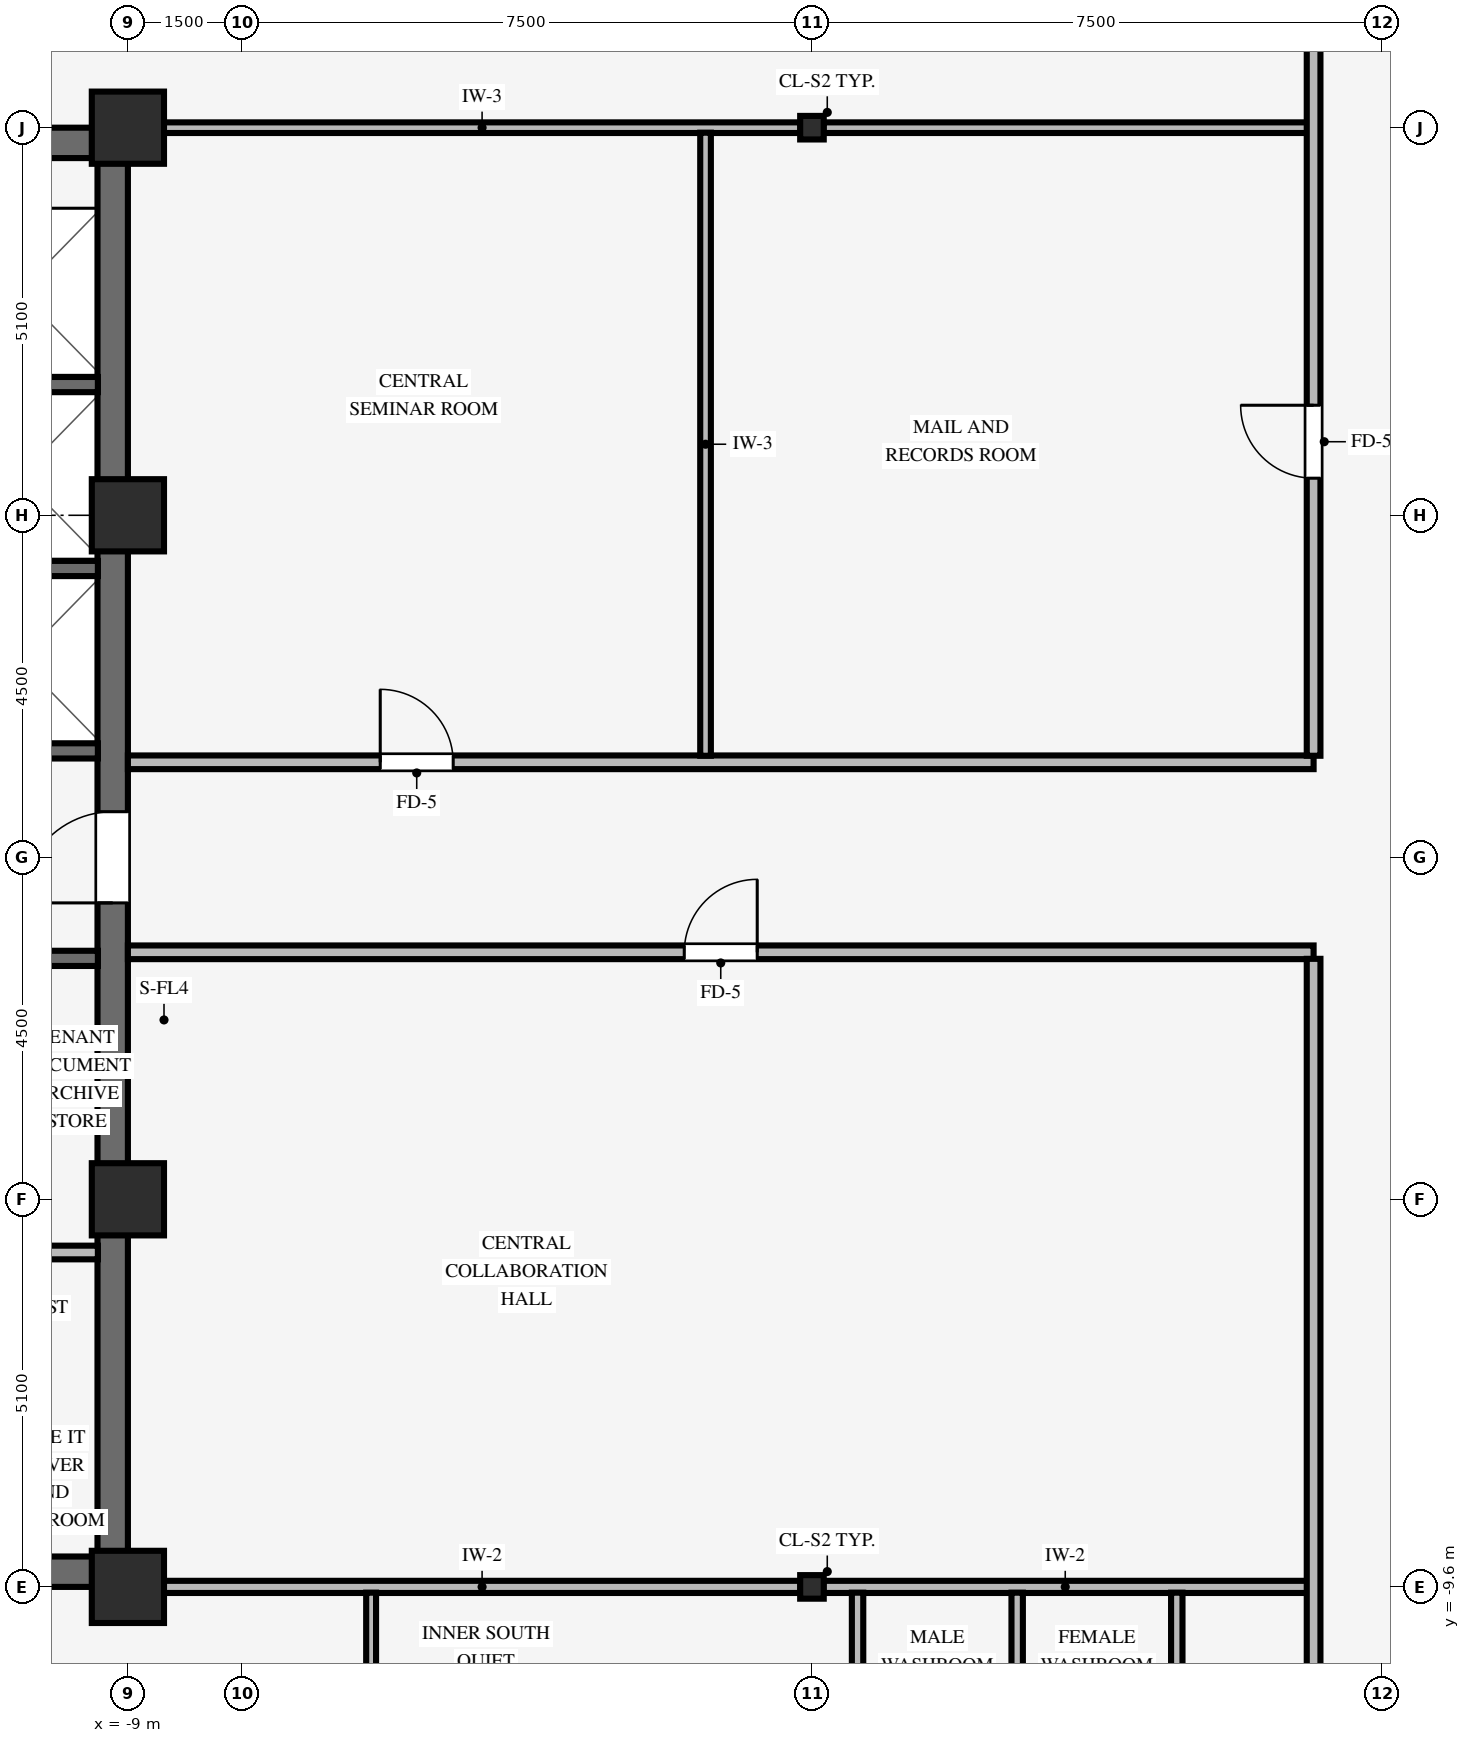
"""IFC4 building model, lengths in metres.
Left out: names, types, materials, properties, quantities, classifications, styles, units other than length and angle.
Written with IfcOpenShell. Run it as: python <this file> out.ifc"""

import sys

from ifc_helpers import new_model, si_unit, direction, frame, frame_2d, origin, origin_2d, place, context, subcontext, project, spatial, rectangle, i_section, extrude, source, transform, mapped, element, fill, save


model = new_model("IFC4")
c1 = context("Model", 3, precision=1e-05, world=origin(), true_north=direction((0.0, 1.0)))
c2 = subcontext(c1, "Body", "Model", "MODEL_VIEW")
j1 = project(units=[si_unit("LENGTHUNIT", "METRE"), si_unit("PLANEANGLEUNIT", "RADIAN")], contexts=[c1])
p1 = place(None, origin())
s1 = spatial("IfcSite", under=j1, at=p1, CompositionType="ELEMENT")
p2 = place(p1, origin())
s2 = spatial("IfcBuilding", under=s1, at=p2, CompositionType="ELEMENT")
p3 = place(p2, frame((0.0, 0.0, 182.25)))
s3 = spatial("IfcBuildingStorey", under=s2, at=p3, CompositionType="ELEMENT", Elevation=182.25)
for number, where, z_axis, x_axis in (
    (1, (-17.5, -9.4, 0.0), (0.0, 0.0, 1.0), (1.0, 0.0, 0.0)),
    (2, (-17.5, 9.4, 0.0), (0.0, 0.0, 1.0), (1.0, 0.0, 0.0)),
):
    element("IfcWall", number, at=place(p3, frame(where, z_axis=z_axis, x_axis=x_axis)), inside=s3, PredefinedType="SHEAR", context=c2, shape_type="SweptSolid", body=[
        extrude(rectangle(XDim=8.5, YDim=0.4, at=frame_2d((4.25, 0.0))), origin(), (0.0, 0.0, 1.0), 3.25),
    ])
p4 = place(p3, frame((-9.2, -9.205, 0.0), z_axis=(0.0, 0.0, 1.0), x_axis=(0.0, 1.0, 0.0)))
e3 = element("IfcWall", 3, at=p4, inside=s3, PredefinedType="SHEAR", context=c2, shape_type="SweptSolid", body=[
    extrude(rectangle(XDim=18.41, YDim=0.4, at=frame_2d((9.205, 0.0))), origin(), (0.0, 0.0, 1.0), 3.25),
])
p5 = place(p4, frame((8.605, 0.0, 0.0)))
e4 = element("IfcOpeningElement", 4, at=p5, cuts=e3, PredefinedType="OPENING", context=c2, shape_type="SweptSolid", body=[
    extrude(rectangle(XDim=1.2, YDim=2.15, at=frame_2d((0.6, 1.075))), frame((0.0, 0.21, 0.0), z_axis=(0.0, -1.0, 0.0), x_axis=(1.0, 0.0, 0.0)), (0.0, 0.0, 1.0), 0.42),
])
for number, where, z_axis, x_axis in (
    (5, (-9.0, -9.6, 0.0), (0.0, 0.0, 1.0), (1.0, 0.0, 0.0)),
    (6, (-9.0, -4.5, 0.0), (0.0, 0.0, 1.0), (1.0, 0.0, 0.0)),
    (7, (-9.0, 4.5, 0.0), (0.0, 0.0, 1.0), (1.0, 0.0, 0.0)),
    (8, (-9.0, 9.6, 0.0), (0.0, 0.0, 1.0), (1.0, 0.0, 0.0)),
):
    element("IfcColumn", number, at=place(p3, frame(where, z_axis=z_axis, x_axis=x_axis)), inside=s3, PredefinedType="COLUMN", context=c2, shape_type="SweptSolid", body=[
        extrude(rectangle(XDim=0.95, YDim=0.95, at=origin_2d()), origin(), (0.0, 0.0, 1.0), 3.25),
    ])
for number, where, z_axis, x_axis in (
    (9, (0.0, -9.6, 0.0), (0.0, 0.0, 1.0), (1.0, 0.0, 0.0)),
    (10, (0.0, 9.6, 0.0), (0.0, 0.0, 1.0), (1.0, 0.0, 0.0)),
):
    element("IfcColumn", number, at=place(p3, frame(where, z_axis=z_axis, x_axis=x_axis)), inside=s3, PredefinedType="COLUMN", context=c2, shape_type="SweptSolid", body=[
        extrude(i_section(OverallWidth=0.31, OverallDepth=0.31, WebThickness=0.015, FlangeThickness=0.015, FilletRadius=0.015, at=origin_2d()), origin(), (0.0, 0.0, 1.0), 3.25),
    ])
p6 = place(p3, frame((-11.505, -1.33, 0.0), z_axis=(0.0, 0.0, 1.0), x_axis=(1.0, 0.0, 0.0)))
e11 = element("IfcWall", 11, at=p6, inside=s3, PredefinedType="SHEAR", context=c2, shape_type="SweptSolid", body=[
    extrude(rectangle(XDim=2.11, YDim=0.2, at=frame_2d((1.055, 0.0))), origin(), (0.0, 0.0, 1.0), 3.25),
])
p7 = place(p3, frame((-11.505, -5.2, 0.0), z_axis=(0.0, 0.0, 1.0), x_axis=(1.0, 0.0, 0.0)))
e12 = element("IfcWall", 12, at=p7, inside=s3, PredefinedType="PARTITIONING", context=c2, shape_type="SweptSolid", body=[
    extrude(rectangle(XDim=2.11, YDim=0.18, at=frame_2d((1.055, 0.0))), origin(), (0.0, 0.0, 1.0), 3.24),
])
for number, where, z_axis, x_axis in (
    (13, (-11.505, 1.4, 0.0), (0.0, 0.0, 1.0), (1.0, 0.0, 0.0)),
    (14, (-11.505, 3.8, 0.0), (0.0, 0.0, 1.0), (1.0, 0.0, 0.0)),
    (15, (-11.505, 6.22, 0.0), (0.0, 0.0, 1.0), (1.0, 0.0, 0.0)),
):
    element("IfcWall", number, at=place(p3, frame(where, z_axis=z_axis, x_axis=x_axis)), inside=s3, PredefinedType="SHEAR", context=c2, shape_type="SweptSolid", body=[
        extrude(rectangle(XDim=2.11, YDim=0.2, at=frame_2d((1.055, 0.0))), origin(), (0.0, 0.0, 1.0), 3.25),
    ])
p8 = place(p3, frame((-8.529, -9.6, 0.0), z_axis=(0.0, 0.0, 1.0), x_axis=(1.0, 0.0, 0.0)))
e16 = element("IfcWall", 16, at=p8, inside=s3, PredefinedType="PARTITIONING", context=c2, shape_type="SweptSolid", body=[
    extrude(rectangle(XDim=8.378, YDim=0.16, at=frame_2d((4.189, 0.0))), origin(), (0.0, 0.0, 1.0), 2.285),
])
p9 = place(p3, frame((0.151, -9.6, 0.0), z_axis=(0.0, 0.0, 1.0), x_axis=(1.0, 0.0, 0.0)))
e17 = element("IfcWall", 17, at=p9, inside=s3, PredefinedType="PARTITIONING", context=c2, shape_type="SweptSolid", body=[
    extrude(rectangle(XDim=6.363, YDim=0.16, at=frame_2d((3.182, 0.0))), origin(), (0.0, 0.0, 1.0), 2.285),
])
p10 = place(p3, frame((-9.0, -1.25, 0.0), z_axis=(0.0, 0.0, 1.0), x_axis=(1.0, 0.0, 0.0)))
e18 = element("IfcWall", 18, at=p10, inside=s3, PredefinedType="PARTITIONING", context=c2, shape_type="SweptSolid", body=[
    extrude(rectangle(XDim=15.6, YDim=0.18, at=frame_2d((7.8, 0.0))), origin(), (0.0, 0.0, 1.0), 3.24),
])
p11 = place(p10, frame((7.32, 0.0, 0.0)))
e19 = element("IfcOpeningElement", 19, at=p11, cuts=e18, PredefinedType="OPENING", context=c2, shape_type="SweptSolid", body=[
    extrude(rectangle(XDim=0.96, YDim=2.1, at=frame_2d((0.48, 1.05))), frame((0.0, 0.1, 0.0), z_axis=(0.0, -1.0, 0.0), x_axis=(1.0, 0.0, 0.0)), (0.0, 0.0, 1.0), 0.2),
])
p12 = place(p3, frame((-9.0, 1.25, 0.0), z_axis=(0.0, 0.0, 1.0), x_axis=(1.0, 0.0, 0.0)))
e20 = element("IfcWall", 20, at=p12, inside=s3, PredefinedType="PARTITIONING", context=c2, shape_type="SweptSolid", body=[
    extrude(rectangle(XDim=15.6, YDim=0.18, at=frame_2d((7.8, 0.0))), origin(), (0.0, 0.0, 1.0), 3.24),
])
p13 = place(p12, frame((3.32, 0.0, 0.0)))
e21 = element("IfcOpeningElement", 21, at=p13, cuts=e20, PredefinedType="OPENING", context=c2, shape_type="SweptSolid", body=[
    extrude(rectangle(XDim=0.96, YDim=2.1, at=frame_2d((0.48, 1.05))), frame((0.0, 0.1, 0.0), z_axis=(0.0, -1.0, 0.0), x_axis=(1.0, 0.0, 0.0)), (0.0, 0.0, 1.0), 0.2),
])
p14 = place(p3, frame((-8.529, 9.6, 0.0), z_axis=(0.0, 0.0, 1.0), x_axis=(1.0, 0.0, 0.0)))
e22 = element("IfcWall", 22, at=p14, inside=s3, PredefinedType="PARTITIONING", context=c2, shape_type="SweptSolid", body=[
    extrude(rectangle(XDim=8.378, YDim=0.14, at=frame_2d((4.189, 0.0))), origin(), (0.0, 0.0, 1.0), 2.285),
])
p15 = place(p3, frame((0.151, 9.6, 0.0), z_axis=(0.0, 0.0, 1.0), x_axis=(1.0, 0.0, 0.0)))
e23 = element("IfcWall", 23, at=p15, inside=s3, PredefinedType="PARTITIONING", context=c2, shape_type="SweptSolid", body=[
    extrude(rectangle(XDim=6.363, YDim=0.14, at=frame_2d((3.182, 0.0))), origin(), (0.0, 0.0, 1.0), 2.285),
])
p16 = place(p3, frame((-5.8, -13.414, 0.0), z_axis=(0.0, 0.0, 1.0), x_axis=(0.0, 1.0, 0.0)))
e24 = element("IfcWall", 24, at=p16, inside=s3, PredefinedType="PARTITIONING", context=c2, shape_type="SweptSolid", body=[
    extrude(rectangle(XDim=3.738, YDim=0.13, at=frame_2d((1.869, 0.0))), origin(), (0.0, 0.0, 1.0), 3.24),
])
p17 = place(p3, frame((-1.4, 1.336, 0.0), z_axis=(0.0, 0.0, 1.0), x_axis=(0.0, 1.0, 0.0)))
e25 = element("IfcWall", 25, at=p17, inside=s3, PredefinedType="PARTITIONING", context=c2, shape_type="SweptSolid", body=[
    extrude(rectangle(XDim=8.198, YDim=0.14, at=frame_2d((4.099, 0.0))), origin(), (0.0, 0.0, 1.0), 3.24),
])
for number, where, z_axis, x_axis in (
    (26, (0.6, -13.414, 0.0), (0.0, 0.0, 1.0), (0.0, 1.0, 0.0)),
    (27, (2.7, -13.414, 0.0), (0.0, 0.0, 1.0), (0.0, 1.0, 0.0)),
    (28, (4.8, -13.414, 0.0), (0.0, 0.0, 1.0), (0.0, 1.0, 0.0)),
):
    element("IfcWall", number, at=place(p3, frame(where, z_axis=z_axis, x_axis=x_axis)), inside=s3, PredefinedType="PARTITIONING", context=c2, shape_type="SweptSolid", body=[
        extrude(rectangle(XDim=3.738, YDim=0.15, at=frame_2d((1.869, 0.0))), origin(), (0.0, 0.0, 1.0), 3.24),
    ])
p18 = place(p3, frame((6.6, -13.414, 0.0), z_axis=(0.0, 0.0, 1.0), x_axis=(0.0, 1.0, 0.0)))
e29 = element("IfcWall", 29, at=p18, inside=s3, PredefinedType="PARTITIONING", context=c2, shape_type="SweptSolid", body=[
    extrude(rectangle(XDim=12.078, YDim=0.18, at=frame_2d((6.039, 0.0))), origin(), (0.0, 0.0, 1.0), 3.24),
])
p19 = place(p18, frame((1.457, 0.0, 0.0)))
e30 = element("IfcOpeningElement", 30, at=p19, cuts=e29, PredefinedType="OPENING", context=c2, shape_type="SweptSolid", body=[
    extrude(rectangle(XDim=0.9, YDim=2.1, at=frame_2d((0.45, 1.05))), frame((0.0, 0.1, 0.0), z_axis=(0.0, -1.0, 0.0), x_axis=(1.0, 0.0, 0.0)), (0.0, 0.0, 1.0), 0.2),
])
p20 = place(p3, frame((6.6, 1.336, 0.0), z_axis=(0.0, 0.0, 1.0), x_axis=(0.0, 1.0, 0.0)))
e31 = element("IfcWall", 31, at=p20, inside=s3, PredefinedType="PARTITIONING", context=c2, shape_type="SweptSolid", body=[
    extrude(rectangle(XDim=12.078, YDim=0.18, at=frame_2d((6.039, 0.0))), origin(), (0.0, 0.0, 1.0), 3.24),
])
p21 = place(p20, frame((3.652, 0.0, 0.0)))
e32 = element("IfcOpeningElement", 32, at=p21, cuts=e31, PredefinedType="OPENING", context=c2, shape_type="SweptSolid", body=[
    extrude(rectangle(XDim=0.96, YDim=2.1, at=frame_2d((0.48, 1.05))), frame((0.0, 0.1, 0.0), z_axis=(0.0, -1.0, 0.0), x_axis=(1.0, 0.0, 0.0)), (0.0, 0.0, 1.0), 0.2),
])
m1 = source(origin(), c2, "Body", "SweptSolid", [
    extrude(rectangle(XDim=1.2, YDim=2.15, at=frame_2d((0.6, 1.075))), frame((0.0, 0.025, 0.0), z_axis=(0.0, -1.0, 0.0), x_axis=(1.0, 0.0, 0.0)), (0.0, 0.0, 1.0), 0.05),
])
p22 = place(p5, origin())
e33 = element("IfcDoor", 33, at=p22, inside=s3, OperationType="SINGLE_SWING_LEFT", PredefinedType="DOOR", context=c2, shape_type="MappedRepresentation", body=[
    mapped(m1, transform((0.0, 0.0, 0.0), scale=1.0)),
])
fill(e4, e33)
m2 = source(origin(), c2, "Body", "SweptSolid", [
    extrude(rectangle(XDim=0.96, YDim=2.1, at=frame_2d((0.48, 1.05))), frame((0.0, 0.025, 0.0), z_axis=(0.0, -1.0, 0.0), x_axis=(1.0, 0.0, 0.0)), (0.0, 0.0, 1.0), 0.05),
])
p23 = place(p11, origin())
e34 = element("IfcDoor", 34, at=p23, inside=s3, OperationType="SINGLE_SWING_RIGHT", PredefinedType="DOOR", context=c2, shape_type="MappedRepresentation", body=[
    mapped(m2, transform((0.0, 0.0, 0.0), scale=1.0)),
])
fill(e19, e34)
p24 = place(p21, origin())
e35 = element("IfcDoor", 35, at=p24, inside=s3, OperationType="SINGLE_SWING_RIGHT", PredefinedType="DOOR", context=c2, shape_type="MappedRepresentation", body=[
    mapped(m2, transform((0.0, 0.0, 0.0), scale=1.0)),
])
fill(e32, e35)
p25 = place(p13, origin())
e36 = element("IfcDoor", 36, at=p25, inside=s3, OperationType="SINGLE_SWING_LEFT", PredefinedType="DOOR", context=c2, shape_type="MappedRepresentation", body=[
    mapped(m2, transform((0.0, 0.0, 0.0), scale=1.0)),
])
fill(e21, e36)
save(model, sys.argv[1])
